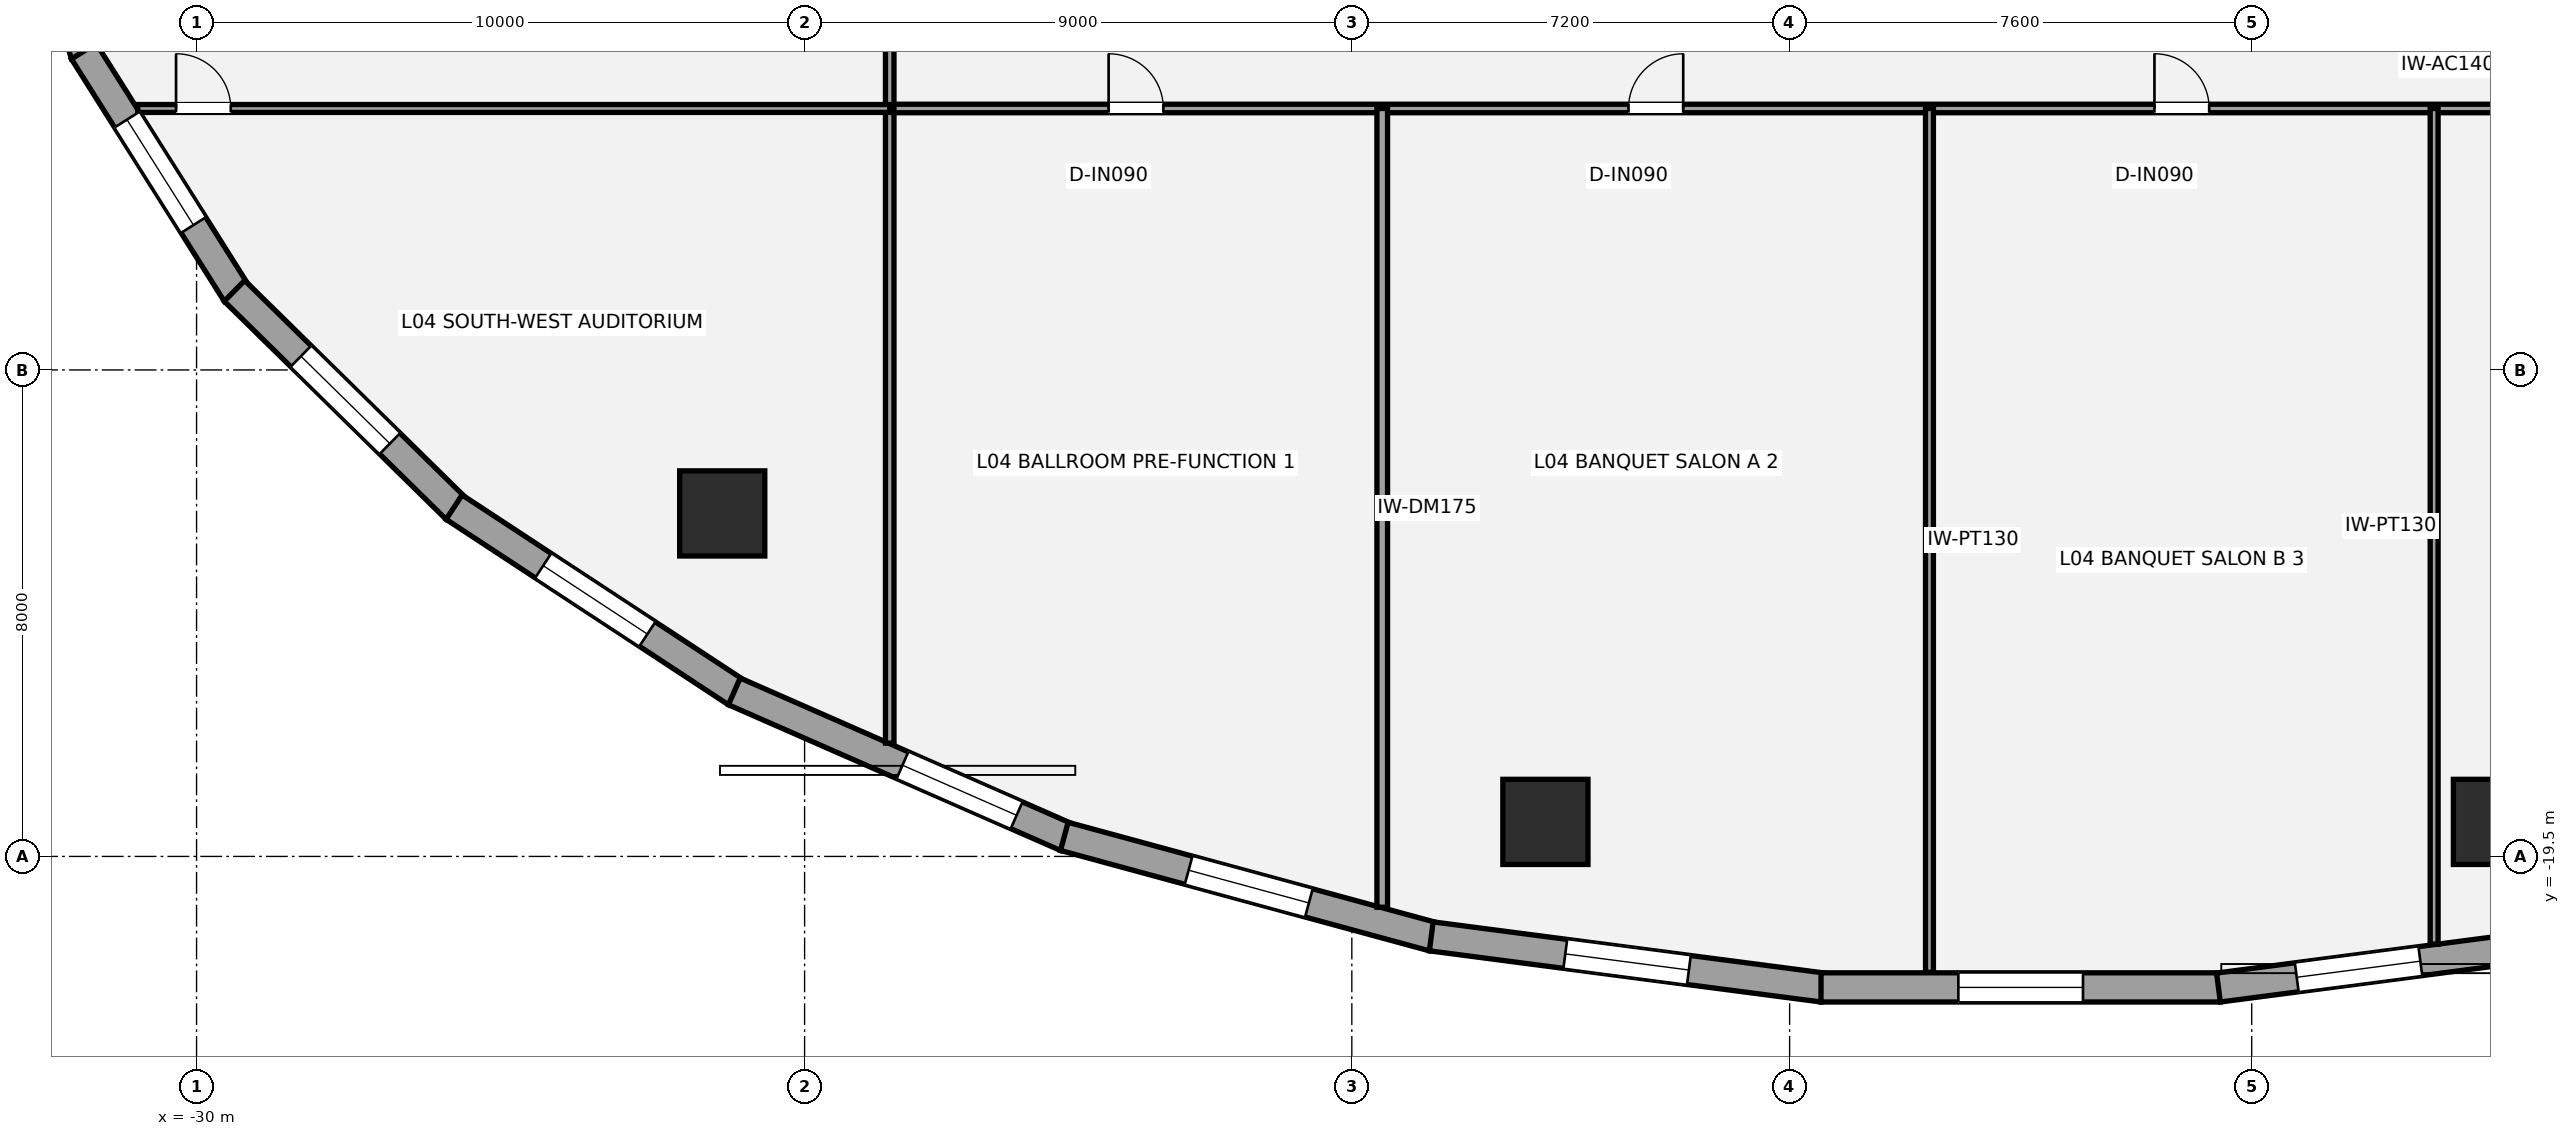
"""IFC4 building model, lengths in metres.
Left out: names, types, materials, properties, quantities, classifications, styles, units other than length and angle.
Written with IfcOpenShell. Run it as: python <this file> out.ifc"""

import sys

from ifc_helpers import new_model, si_unit, direction, frame, frame_2d, origin, origin_2d, place, context, subcontext, project, spatial, rectangle, hollow_circle, extrude, element, fill, save


model = new_model("IFC4")
c1 = context("Model", 3, precision=1e-05, world=origin(), true_north=direction((0.0, 1.0)))
c2 = subcontext(c1, "Body", "Model", "MODEL_VIEW")
j1 = project(units=[si_unit("LENGTHUNIT", "METRE"), si_unit("PLANEANGLEUNIT", "RADIAN")], contexts=[c1])
p1 = place(None, origin())
s1 = spatial("IfcSite", under=j1, at=p1, CompositionType="ELEMENT")
p2 = place(p1, origin())
s2 = spatial("IfcBuilding", under=s1, at=p2, CompositionType="ELEMENT")
p3 = place(p2, frame((0.0, 0.0, 18.6)))
s3 = spatial("IfcBuildingStorey", under=s2, at=p3, CompositionType="ELEMENT", Elevation=18.6)
for number, where, z_axis, x_axis in (
    (1, (-21.354, -13.859, 0.0), (0.0, 0.0, 1.0), (1.0, 0.0, 0.0)),
    (2, (-7.816, -18.932, 0.0), (0.0, 0.0, 1.0), (1.0, 0.0, 0.0)),
    (3, (7.816, -18.932, 0.0), (0.0, 0.0, 1.0), (1.0, 0.0, 0.0)),
):
    element("IfcColumn", number, at=place(p3, frame(where, z_axis=z_axis, x_axis=x_axis)), inside=s3, PredefinedType="USERDEFINED", context=c2, shape_type="SweptSolid", body=[
        extrude(hollow_circle(Radius=0.7, WallThickness=0.05, at=origin_2d()), origin(), (0.0, 0.0, 1.0), 4.2),
    ])
p4 = place(p3, frame((-31.828, -6.317, 0.0), z_axis=(0.0, 0.0, 1.0), x_axis=(-0.289855603468, 0.957070388811, 0.0)))
e4 = element("IfcWall", 4, at=p4, inside=s3, PredefinedType="STANDARD", context=c2, shape_type="SweptSolid", body=[
    extrude(rectangle(XDim=4.419, YDim=0.48, at=frame_2d((2.21, 0.0))), origin(), (0.0, 0.0, 1.0), 3.109),
])
p5 = place(p4, frame((1.185, 0.0, 0.72)))
e5 = element("IfcOpeningElement", 5, at=p5, cuts=e4, PredefinedType="OPENING", context=c2, shape_type="SweptSolid", body=[
    extrude(rectangle(XDim=2.05, YDim=1.8, at=frame_2d((1.025, 0.9))), frame((0.0, 0.25, 0.0), z_axis=(0.0, -1.0, 0.0), x_axis=(1.0, 0.0, 0.0)), (0.0, 0.0, 1.0), 0.5),
])
p6 = place(p3, frame((-29.341, -10.243, 0.0), z_axis=(0.0, 0.0, 1.0), x_axis=(-0.53349762721, 0.845801561693, 0.0)))
e6 = element("IfcWall", 6, at=p6, inside=s3, PredefinedType="STANDARD", context=c2, shape_type="SweptSolid", body=[
    extrude(rectangle(XDim=4.711, YDim=0.48, at=frame_2d((2.355, 0.0))), origin(), (0.0, 0.0, 1.0), 3.109),
])
p7 = place(p6, frame((1.33, 0.0, 0.72)))
e7 = element("IfcOpeningElement", 7, at=p7, cuts=e6, PredefinedType="OPENING", context=c2, shape_type="SweptSolid", body=[
    extrude(rectangle(XDim=2.05, YDim=1.8, at=frame_2d((1.025, 0.9))), frame((0.0, 0.25, 0.0), z_axis=(0.0, -1.0, 0.0), x_axis=(1.0, 0.0, 0.0)), (0.0, 0.0, 1.0), 0.5),
])
p8 = place(p3, frame((-25.728, -13.785, 0.0), z_axis=(0.0, 0.0, 1.0), x_axis=(-0.713189080178, 0.700971708355, 0.0)))
e8 = element("IfcWall", 8, at=p8, inside=s3, PredefinedType="STANDARD", context=c2, shape_type="SweptSolid", body=[
    extrude(rectangle(XDim=5.116, YDim=0.48, at=frame_2d((2.558, 0.0))), origin(), (0.0, 0.0, 1.0), 3.109),
])
p9 = place(p8, frame((1.533, 0.0, 0.72)))
e9 = element("IfcOpeningElement", 9, at=p9, cuts=e8, PredefinedType="OPENING", context=c2, shape_type="SweptSolid", body=[
    extrude(rectangle(XDim=2.05, YDim=1.8, at=frame_2d((1.025, 0.9))), frame((0.0, 0.25, 0.0), z_axis=(0.0, -1.0, 0.0), x_axis=(1.0, 0.0, 0.0)), (0.0, 0.0, 1.0), 0.5),
])
p10 = place(p3, frame((-21.121, -16.806, 0.0), z_axis=(0.0, 0.0, 1.0), x_axis=(-0.835863918172, 0.548936708827, 0.0)))
e10 = element("IfcWall", 10, at=p10, inside=s3, PredefinedType="STANDARD", context=c2, shape_type="SweptSolid", body=[
    extrude(rectangle(XDim=5.555, YDim=0.48, at=frame_2d((2.778, 0.0))), origin(), (0.0, 0.0, 1.0), 3.109),
])
p11 = place(p10, frame((1.753, 0.0, 0.72)))
e11 = element("IfcOpeningElement", 11, at=p11, cuts=e10, PredefinedType="OPENING", context=c2, shape_type="SweptSolid", body=[
    extrude(rectangle(XDim=2.05, YDim=1.8, at=frame_2d((1.025, 0.9))), frame((0.0, 0.25, 0.0), z_axis=(0.0, -1.0, 0.0), x_axis=(1.0, 0.0, 0.0)), (0.0, 0.0, 1.0), 0.5),
])
p12 = place(p3, frame((-15.695, -19.183, 0.0), z_axis=(0.0, 0.0, 1.0), x_axis=(-0.91570760638, 0.401845218484, 0.0)))
e12 = element("IfcWall", 12, at=p12, inside=s3, PredefinedType="STANDARD", context=c2, shape_type="SweptSolid", body=[
    extrude(rectangle(XDim=5.963, YDim=0.48, at=frame_2d((2.981, 0.0))), origin(), (0.0, 0.0, 1.0), 3.109),
])
p13 = place(p12, frame((0.893, 0.0, 0.72)))
e13 = element("IfcOpeningElement", 13, at=p13, cuts=e12, PredefinedType="OPENING", context=c2, shape_type="SweptSolid", body=[
    extrude(rectangle(XDim=2.05, YDim=1.8, at=frame_2d((1.025, 0.9))), frame((0.0, 0.25, 0.0), z_axis=(0.0, -1.0, 0.0), x_axis=(1.0, 0.0, 0.0)), (0.0, 0.0, 1.0), 0.5),
])
p14 = place(p3, frame((-9.662, -20.821, 0.0), z_axis=(0.0, 0.0, 1.0), x_axis=(-0.964936550718, 0.262483243445, 0.0)))
e14 = element("IfcWall", 14, at=p14, inside=s3, PredefinedType="STANDARD", context=c2, shape_type="SweptSolid", body=[
    extrude(rectangle(XDim=6.288, YDim=0.48, at=frame_2d((3.144, 0.0))), origin(), (0.0, 0.0, 1.0), 3.109),
])
p15 = place(p14, frame((2.119, 0.0, 0.72)))
e15 = element("IfcOpeningElement", 15, at=p15, cuts=e14, PredefinedType="OPENING", context=c2, shape_type="SweptSolid", body=[
    extrude(rectangle(XDim=2.05, YDim=1.8, at=frame_2d((1.025, 0.9))), frame((0.0, 0.25, 0.0), z_axis=(0.0, -1.0, 0.0), x_axis=(1.0, 0.0, 0.0)), (0.0, 0.0, 1.0), 0.5),
])
p16 = place(p3, frame((-3.252, -21.656, 0.0), z_axis=(0.0, 0.0, 1.0), x_axis=(-0.991576921472, 0.129519144545, 0.0)))
e16 = element("IfcWall", 16, at=p16, inside=s3, PredefinedType="STANDARD", context=c2, shape_type="SweptSolid", body=[
    extrude(rectangle(XDim=6.496, YDim=0.48, at=frame_2d((3.248, 0.0))), origin(), (0.0, 0.0, 1.0), 3.109),
])
p17 = place(p16, frame((2.223, 0.0, 0.72)))
e17 = element("IfcOpeningElement", 17, at=p17, cuts=e16, PredefinedType="OPENING", context=c2, shape_type="SweptSolid", body=[
    extrude(rectangle(XDim=2.05, YDim=1.8, at=frame_2d((1.025, 0.9))), frame((0.0, 0.25, 0.0), z_axis=(0.0, -1.0, 0.0), x_axis=(1.0, 0.0, 0.0)), (0.0, 0.0, 1.0), 0.5),
])
p18 = place(p3, frame((3.284, -21.654, 0.0), z_axis=(0.0, 0.0, 1.0), x_axis=(-1.0, 0.0, 0.0)))
e18 = element("IfcWall", 18, at=p18, inside=s3, PredefinedType="STANDARD", context=c2, shape_type="SweptSolid", body=[
    extrude(rectangle(XDim=6.567, YDim=0.48, at=frame_2d((3.284, 0.0))), origin(), (0.0, 0.0, 1.0), 3.109),
])
p19 = place(p18, frame((2.259, 0.0, 0.72)))
e19 = element("IfcOpeningElement", 19, at=p19, cuts=e18, PredefinedType="OPENING", context=c2, shape_type="SweptSolid", body=[
    extrude(rectangle(XDim=2.05, YDim=1.8, at=frame_2d((1.025, 0.9))), frame((0.0, 0.25, 0.0), z_axis=(0.0, -1.0, 0.0), x_axis=(1.0, 0.0, 0.0)), (0.0, 0.0, 1.0), 0.5),
])
p20 = place(p3, frame((9.693, -20.815, 0.0), z_axis=(0.0, 0.0, 1.0), x_axis=(-0.991576921472, -0.129519144545, 0.0)))
e20 = element("IfcWall", 20, at=p20, inside=s3, PredefinedType="STANDARD", context=c2, shape_type="SweptSolid", body=[
    extrude(rectangle(XDim=6.496, YDim=0.48, at=frame_2d((3.248, 0.0))), origin(), (0.0, 0.0, 1.0), 3.109),
])
p21 = place(p20, frame((3.147, 0.0, 0.72)))
e21 = element("IfcOpeningElement", 21, at=p21, cuts=e20, PredefinedType="OPENING", context=c2, shape_type="SweptSolid", body=[
    extrude(rectangle(XDim=2.05, YDim=1.8, at=frame_2d((1.025, 0.9))), frame((0.0, 0.25, 0.0), z_axis=(0.0, -1.0, 0.0), x_axis=(1.0, 0.0, 0.0)), (0.0, 0.0, 1.0), 0.5),
])
p22 = place(p3, frame((-18.6, -7.2, 0.0), z_axis=(0.0, 0.0, 1.0), x_axis=(1.0, 0.0, 0.0)))
e22 = element("IfcWall", 22, at=p22, inside=s3, PredefinedType="PARTITIONING", context=c2, shape_type="SweptSolid", body=[
    extrude(rectangle(XDim=34.6, YDim=0.14, at=frame_2d((17.3, 0.0))), origin(), (0.0, 0.0, 1.0), 3.98),
])
p23 = place(p22, frame((3.6, 0.0, 0.0)))
e23 = element("IfcOpeningElement", 23, at=p23, cuts=e22, PredefinedType="OPENING", context=c2, shape_type="SweptSolid", body=[
    extrude(rectangle(XDim=0.9, YDim=2.1, at=frame_2d((0.45, 1.05))), frame((0.0, 0.08, 0.0), z_axis=(0.0, -1.0, 0.0), x_axis=(1.0, 0.0, 0.0)), (0.0, 0.0, 1.0), 0.16),
])
p24 = place(p22, frame((12.15, 0.0, 0.0)))
e24 = element("IfcOpeningElement", 24, at=p24, cuts=e22, PredefinedType="OPENING", context=c2, shape_type="SweptSolid", body=[
    extrude(rectangle(XDim=0.9, YDim=2.1, at=frame_2d((0.45, 1.05))), frame((0.0, 0.08, 0.0), z_axis=(0.0, -1.0, 0.0), x_axis=(1.0, 0.0, 0.0)), (0.0, 0.0, 1.0), 0.16),
])
p25 = place(p22, frame((20.8, 0.0, 0.0)))
e25 = element("IfcOpeningElement", 25, at=p25, cuts=e22, PredefinedType="OPENING", context=c2, shape_type="SweptSolid", body=[
    extrude(rectangle(XDim=0.9, YDim=2.1, at=frame_2d((0.45, 1.05))), frame((0.0, 0.08, 0.0), z_axis=(0.0, -1.0, 0.0), x_axis=(1.0, 0.0, 0.0)), (0.0, 0.0, 1.0), 0.16),
])
p26 = place(p22, frame((29.55, 0.0, 0.0)))
e26 = element("IfcOpeningElement", 26, at=p26, cuts=e22, PredefinedType="OPENING", context=c2, shape_type="SweptSolid", body=[
    extrude(rectangle(XDim=0.9, YDim=2.1, at=frame_2d((0.45, 1.05))), frame((0.0, 0.08, 0.0), z_axis=(0.0, -1.0, 0.0), x_axis=(1.0, 0.0, 0.0)), (0.0, 0.0, 1.0), 0.16),
])
p27 = place(p3, frame((-18.6, -17.637, 0.0), z_axis=(0.0, 0.0, 1.0), x_axis=(0.0, 1.0, 0.0)))
e27 = element("IfcWall", 27, at=p27, inside=s3, PredefinedType="PARTITIONING", context=c2, shape_type="SweptSolid", body=[
    extrude(rectangle(XDim=25.187, YDim=0.14, at=frame_2d((12.594, 0.0))), origin(), (0.0, 0.0, 1.0), 3.348),
])
p28 = place(p27, frame((14.487, 0.0, 0.0)))
e28 = element("IfcOpeningElement", 28, at=p28, cuts=e27, PredefinedType="OPENING", context=c2, shape_type="SweptSolid", body=[
    extrude(rectangle(XDim=0.9, YDim=2.1, at=frame_2d((0.45, 1.05))), frame((0.0, 0.08, 0.0), z_axis=(0.0, -1.0, 0.0), x_axis=(1.0, 0.0, 0.0)), (0.0, 0.0, 1.0), 0.16),
])
p29 = place(p27, frame((21.862, 0.0, 0.0)))
e29 = element("IfcOpeningElement", 29, at=p29, cuts=e27, PredefinedType="OPENING", context=c2, shape_type="SweptSolid", body=[
    extrude(rectangle(XDim=0.9, YDim=2.1, at=frame_2d((0.45, 1.05))), frame((0.0, 0.08, 0.0), z_axis=(0.0, -1.0, 0.0), x_axis=(1.0, 0.0, 0.0)), (0.0, 0.0, 1.0), 0.16),
])
p30 = place(p3, frame((-10.5, -20.336, 0.0), z_axis=(0.0, 0.0, 1.0), x_axis=(0.0, 1.0, 0.0)))
e30 = element("IfcWall", 30, at=p30, inside=s3, PredefinedType="PARTITIONING", context=c2, shape_type="SweptSolid", body=[
    extrude(rectangle(XDim=13.136, YDim=0.175, at=frame_2d((6.568, 0.0))), origin(), (0.0, 0.0, 1.0), 3.98),
])
p31 = place(p3, frame((-1.5, -21.406, 0.0), z_axis=(0.0, 0.0, 1.0), x_axis=(0.0, 1.0, 0.0)))
e31 = element("IfcWall", 31, at=p31, inside=s3, PredefinedType="PARTITIONING", context=c2, shape_type="SweptSolid", body=[
    extrude(rectangle(XDim=14.206, YDim=0.13, at=frame_2d((7.103, 0.0))), origin(), (0.0, 0.0, 1.0), 3.98),
])
p32 = place(p3, frame((6.8, -20.943, 0.0), z_axis=(0.0, 0.0, 1.0), x_axis=(0.0, 1.0, 0.0)))
e32 = element("IfcWall", 32, at=p32, inside=s3, PredefinedType="PARTITIONING", context=c2, shape_type="SweptSolid", body=[
    extrude(rectangle(XDim=13.743, YDim=0.13, at=frame_2d((6.871, 0.0))), origin(), (0.0, 0.0, 1.0), 3.348),
])
p33 = place(p3, frame((-30.967, -7.2, 0.0), z_axis=(0.0, 0.0, 1.0), x_axis=(1.0, 0.0, 0.0)))
e33 = element("IfcWall", 33, at=p33, inside=s3, PredefinedType="PARTITIONING", context=c2, shape_type="SweptSolid", body=[
    extrude(rectangle(XDim=12.367, YDim=0.13, at=frame_2d((6.184, 0.0))), origin(), (0.0, 0.0, 1.0), 2.958),
])
p34 = place(p33, frame((0.63, 0.0, 0.0)))
e34 = element("IfcOpeningElement", 34, at=p34, cuts=e33, PredefinedType="OPENING", context=c2, shape_type="SweptSolid", body=[
    extrude(rectangle(XDim=0.9, YDim=2.1, at=frame_2d((0.45, 1.05))), frame((0.0, 0.075, 0.0), z_axis=(0.0, -1.0, 0.0), x_axis=(1.0, 0.0, 0.0)), (0.0, 0.0, 1.0), 0.15),
])
p35 = place(p7, origin())
e35 = element("IfcWindow", 35, at=p35, inside=s3, PartitioningType="SINGLE_PANEL", PredefinedType="WINDOW", context=c2, shape_type="SweptSolid", body=[
    extrude(rectangle(XDim=2.05, YDim=1.8, at=frame_2d((1.025, 0.9))), frame((0.0, -0.01, 0.0), z_axis=(0.0, -1.0, 0.0), x_axis=(1.0, 0.0, 0.0)), (0.0, 0.0, 1.0), 0.06),
])
fill(e7, e35)
p36 = place(p9, origin())
e36 = element("IfcWindow", 36, at=p36, inside=s3, PartitioningType="SINGLE_PANEL", PredefinedType="WINDOW", context=c2, shape_type="SweptSolid", body=[
    extrude(rectangle(XDim=2.05, YDim=1.8, at=frame_2d((1.025, 0.9))), frame((0.0, -0.01, 0.0), z_axis=(0.0, -1.0, 0.0), x_axis=(1.0, 0.0, 0.0)), (0.0, 0.0, 1.0), 0.06),
])
fill(e9, e36)
p37 = place(p11, origin())
e37 = element("IfcWindow", 37, at=p37, inside=s3, PartitioningType="SINGLE_PANEL", PredefinedType="WINDOW", context=c2, shape_type="SweptSolid", body=[
    extrude(rectangle(XDim=2.05, YDim=1.8, at=frame_2d((1.025, 0.9))), frame((0.0, -0.01, 0.0), z_axis=(0.0, -1.0, 0.0), x_axis=(1.0, 0.0, 0.0)), (0.0, 0.0, 1.0), 0.06),
])
fill(e11, e37)
p38 = place(p13, origin())
e38 = element("IfcWindow", 38, at=p38, inside=s3, PartitioningType="SINGLE_PANEL", PredefinedType="WINDOW", context=c2, shape_type="SweptSolid", body=[
    extrude(rectangle(XDim=2.05, YDim=1.8, at=frame_2d((1.025, 0.9))), frame((0.0, -0.01, 0.0), z_axis=(0.0, -1.0, 0.0), x_axis=(1.0, 0.0, 0.0)), (0.0, 0.0, 1.0), 0.06),
])
fill(e13, e38)
p39 = place(p15, origin())
e39 = element("IfcWindow", 39, at=p39, inside=s3, PartitioningType="SINGLE_PANEL", PredefinedType="WINDOW", context=c2, shape_type="SweptSolid", body=[
    extrude(rectangle(XDim=2.05, YDim=1.8, at=frame_2d((1.025, 0.9))), frame((0.0, -0.01, 0.0), z_axis=(0.0, -1.0, 0.0), x_axis=(1.0, 0.0, 0.0)), (0.0, 0.0, 1.0), 0.06),
])
fill(e15, e39)
p40 = place(p17, origin())
e40 = element("IfcWindow", 40, at=p40, inside=s3, PartitioningType="SINGLE_PANEL", PredefinedType="WINDOW", context=c2, shape_type="SweptSolid", body=[
    extrude(rectangle(XDim=2.05, YDim=1.8, at=frame_2d((1.025, 0.9))), frame((0.0, -0.01, 0.0), z_axis=(0.0, -1.0, 0.0), x_axis=(1.0, 0.0, 0.0)), (0.0, 0.0, 1.0), 0.06),
])
fill(e17, e40)
p41 = place(p19, origin())
e41 = element("IfcWindow", 41, at=p41, inside=s3, PartitioningType="SINGLE_PANEL", PredefinedType="WINDOW", context=c2, shape_type="SweptSolid", body=[
    extrude(rectangle(XDim=2.05, YDim=1.8, at=frame_2d((1.025, 0.9))), frame((0.0, -0.01, 0.0), z_axis=(0.0, -1.0, 0.0), x_axis=(1.0, 0.0, 0.0)), (0.0, 0.0, 1.0), 0.06),
])
fill(e19, e41)
p42 = place(p21, origin())
e42 = element("IfcWindow", 42, at=p42, inside=s3, PartitioningType="SINGLE_PANEL", PredefinedType="WINDOW", context=c2, shape_type="SweptSolid", body=[
    extrude(rectangle(XDim=2.05, YDim=1.8, at=frame_2d((1.025, 0.9))), frame((0.0, -0.01, 0.0), z_axis=(0.0, -1.0, 0.0), x_axis=(1.0, 0.0, 0.0)), (0.0, 0.0, 1.0), 0.06),
])
fill(e21, e42)
p43 = place(p23, origin())
e43 = element("IfcDoor", 43, at=p43, inside=s3, OperationType="SINGLE_SWING_LEFT", PredefinedType="DOOR", context=c2, shape_type="SweptSolid", body=[
    extrude(rectangle(XDim=0.9, YDim=2.1, at=frame_2d((0.45, 1.05))), frame((0.0, 0.025, 0.0), z_axis=(0.0, -1.0, 0.0), x_axis=(1.0, 0.0, 0.0)), (0.0, 0.0, 1.0), 0.05),
])
fill(e23, e43)
p44 = place(p24, origin())
e44 = element("IfcDoor", 44, at=p44, inside=s3, OperationType="SINGLE_SWING_RIGHT", PredefinedType="DOOR", context=c2, shape_type="SweptSolid", body=[
    extrude(rectangle(XDim=0.9, YDim=2.1, at=frame_2d((0.45, 1.05))), frame((0.0, 0.025, 0.0), z_axis=(0.0, -1.0, 0.0), x_axis=(1.0, 0.0, 0.0)), (0.0, 0.0, 1.0), 0.05),
])
fill(e24, e44)
p45 = place(p25, origin())
e45 = element("IfcDoor", 45, at=p45, inside=s3, OperationType="SINGLE_SWING_LEFT", PredefinedType="DOOR", context=c2, shape_type="SweptSolid", body=[
    extrude(rectangle(XDim=0.9, YDim=2.1, at=frame_2d((0.45, 1.05))), frame((0.0, 0.025, 0.0), z_axis=(0.0, -1.0, 0.0), x_axis=(1.0, 0.0, 0.0)), (0.0, 0.0, 1.0), 0.05),
])
fill(e25, e45)
p46 = place(p34, origin())
e46 = element("IfcDoor", 46, at=p46, inside=s3, OperationType="SINGLE_SWING_LEFT", PredefinedType="DOOR", context=c2, shape_type="SweptSolid", body=[
    extrude(rectangle(XDim=0.9, YDim=2.1, at=frame_2d((0.45, 1.05))), frame((0.0, 0.025, 0.0), z_axis=(0.0, -1.0, 0.0), x_axis=(1.0, 0.0, 0.0)), (0.0, 0.0, 1.0), 0.05),
])
fill(e34, e46)
save(model, sys.argv[1])
